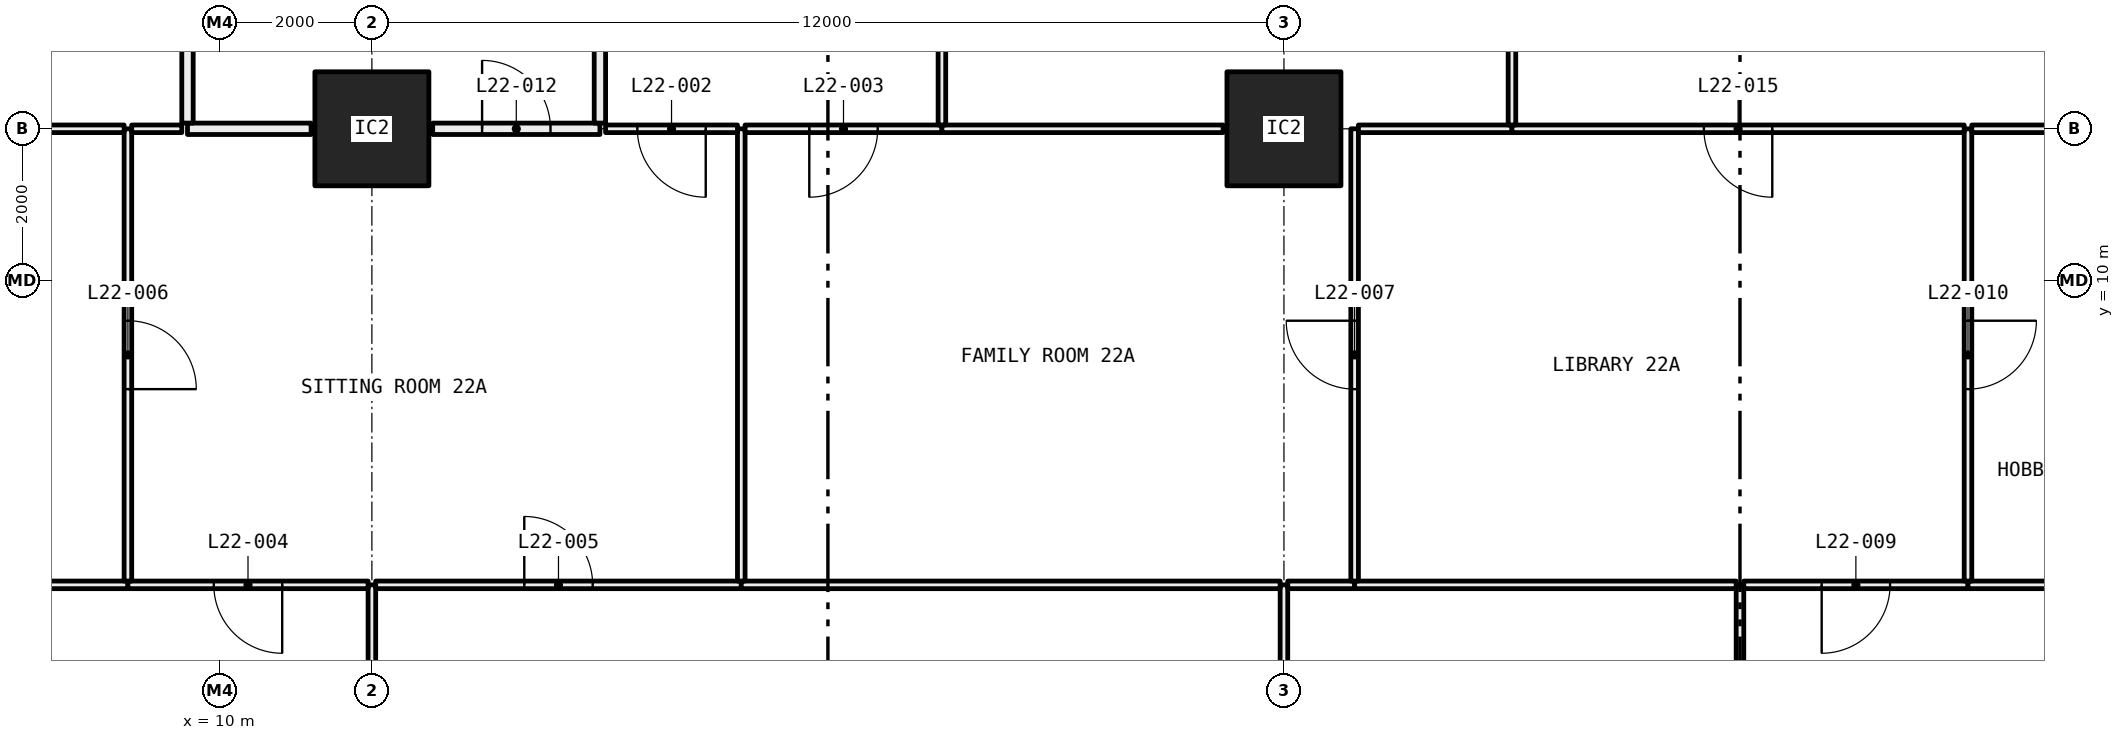
"""IFC4 building model, lengths in metres.
Left out: names, types, materials, properties, quantities, classifications, styles, units other than length and angle.
Written with IfcOpenShell. Run it as: python <this file> out.ifc"""

import sys

from ifc_helpers import new_model, si_unit, direction, frame, frame_2d, origin, origin_2d, place, context, subcontext, project, spatial, rectangle, hollow_rectangle, extrude, element, fill, save


model = new_model("IFC4")
c1 = context("Model", 3, precision=1e-05, world=origin(), true_north=direction((0.0, 1.0)))
c2 = subcontext(c1, "Body", "Model", "MODEL_VIEW")
j1 = project(units=[si_unit("LENGTHUNIT", "METRE"), si_unit("PLANEANGLEUNIT", "RADIAN")], contexts=[c1])
p1 = place(None, origin())
s1 = spatial("IfcSite", under=j1, at=p1, CompositionType="ELEMENT")
p2 = place(p1, origin())
s2 = spatial("IfcBuilding", under=s1, at=p2, CompositionType="ELEMENT")
p3 = place(p2, frame((0.0, 0.0, 88.65)))
s3 = spatial("IfcBuildingStorey", under=s2, at=p3, CompositionType="ELEMENT", Elevation=88.65)
for number, where, z_axis, x_axis in (
    (1, (12.0, 12.0, 0.0), (0.0, 0.0, 1.0), (1.0, 0.0, 0.0)),
    (2, (24.0, 12.0, 0.0), (0.0, 0.0, 1.0), (1.0, 0.0, 0.0)),
):
    element("IfcColumn", number, at=place(p3, frame(where, z_axis=z_axis, x_axis=x_axis)), inside=s3, PredefinedType="COLUMN", context=c2, shape_type="SweptSolid", body=[
        extrude(hollow_rectangle(XDim=1.5, YDim=1.5, WallThickness=0.065, at=origin_2d()), origin(), (0.0, 0.0, 1.0), 3.05),
    ])
p4 = place(p3, frame((12.0, 0.72, 0.0), z_axis=(0.0, 0.0, 1.0), x_axis=(0.0, 1.0, 0.0)))
e3 = element("IfcWall", 3, at=p4, inside=s3, PredefinedType="PARTITIONING", context=c2, shape_type="SweptSolid", body=[
    extrude(rectangle(XDim=5.28, YDim=0.1, at=frame_2d((2.64, 0.0))), origin(), (0.0, 0.0, 1.0), 2.45),
])
p5 = place(p3, frame((8.79, 6.0, 0.0), z_axis=(0.0, 0.0, 1.0), x_axis=(-1.0, 0.0, 0.0)))
e4 = element("IfcWall", 4, at=p5, inside=s3, PredefinedType="PARTITIONING", context=c2, shape_type="SweptSolid", body=[
    extrude(rectangle(XDim=2.07, YDim=0.1, at=frame_2d((1.035, 0.0))), origin(), (0.0, 0.0, 1.0), 3.05),
])
p6 = place(p3, frame((11.95, 6.0, 0.0), z_axis=(0.0, 0.0, 1.0), x_axis=(-1.0, 0.0, 0.0)))
e5 = element("IfcWall", 5, at=p6, inside=s3, PredefinedType="PARTITIONING", context=c2, shape_type="SweptSolid", body=[
    extrude(rectangle(XDim=3.16, YDim=0.1, at=frame_2d((1.58, 0.0))), origin(), (0.0, 0.0, 1.0), 2.45),
])
p7 = place(p6, frame((1.13, 0.0, 0.0)))
e6 = element("IfcOpeningElement", 6, at=p7, cuts=e5, PredefinedType="OPENING", context=c2, shape_type="SweptSolid", body=[
    extrude(rectangle(XDim=0.9, YDim=2.1, at=frame_2d((0.45, 1.05))), frame((0.0, 0.06, 0.0), z_axis=(0.0, -1.0, 0.0), x_axis=(1.0, 0.0, 0.0)), (0.0, 0.0, 1.0), 0.12),
])
p8 = place(p3, frame((24.0, 0.72, 0.0), z_axis=(0.0, 0.0, 1.0), x_axis=(0.0, 1.0, 0.0)))
e7 = element("IfcWall", 7, at=p8, inside=s3, PredefinedType="PARTITIONING", context=c2, shape_type="SweptSolid", body=[
    extrude(rectangle(XDim=5.28, YDim=0.1, at=frame_2d((2.64, 0.0))), origin(), (0.0, 0.0, 1.0), 2.45),
])
p9 = place(p8, frame((2.19, 0.0, 0.0)))
e8 = element("IfcOpeningElement", 8, at=p9, cuts=e7, PredefinedType="OPENING", context=c2, shape_type="SweptSolid", body=[
    extrude(rectangle(XDim=0.9, YDim=2.1, at=frame_2d((0.45, 1.05))), frame((0.0, 0.06, 0.0), z_axis=(0.0, -1.0, 0.0), x_axis=(1.0, 0.0, 0.0)), (0.0, 0.0, 1.0), 0.12),
])
p10 = place(p3, frame((16.86, 6.0, 0.0), z_axis=(0.0, 0.0, 1.0), x_axis=(-1.0, 0.0, 0.0)))
e9 = element("IfcWall", 9, at=p10, inside=s3, PredefinedType="PARTITIONING", context=c2, shape_type="SweptSolid", body=[
    extrude(rectangle(XDim=4.81, YDim=0.1, at=frame_2d((2.405, 0.0))), origin(), (0.0, 0.0, 1.0), 2.45),
])
p11 = place(p10, frame((1.955, 0.0, 0.0)))
e10 = element("IfcOpeningElement", 10, at=p11, cuts=e9, PredefinedType="OPENING", context=c2, shape_type="SweptSolid", body=[
    extrude(rectangle(XDim=0.9, YDim=2.1, at=frame_2d((0.45, 1.05))), frame((0.0, 0.06, 0.0), z_axis=(0.0, -1.0, 0.0), x_axis=(1.0, 0.0, 0.0)), (0.0, 0.0, 1.0), 0.12),
])
p12 = place(p3, frame((23.95, 6.0, 0.0), z_axis=(0.0, 0.0, 1.0), x_axis=(-1.0, 0.0, 0.0)))
e11 = element("IfcWall", 11, at=p12, inside=s3, PredefinedType="PARTITIONING", context=c2, shape_type="SweptSolid", body=[
    extrude(rectangle(XDim=7.09, YDim=0.1, at=frame_2d((3.545, 0.0))), origin(), (0.0, 0.0, 1.0), 2.45),
])
p13 = place(p3, frame((30.0, 0.72, 0.0), z_axis=(0.0, 0.0, 1.0), x_axis=(0.0, 1.0, 0.0)))
e12 = element("IfcWall", 12, at=p13, inside=s3, PredefinedType="PARTITIONING", context=c2, shape_type="SweptSolid", body=[
    extrude(rectangle(XDim=5.28, YDim=0.1, at=frame_2d((2.64, 0.0))), origin(), (0.0, 0.0, 1.0), 3.05),
])
p14 = place(p3, frame((24.93, 6.0, 0.0), z_axis=(0.0, 0.0, 1.0), x_axis=(-1.0, 0.0, 0.0)))
e13 = element("IfcWall", 13, at=p14, inside=s3, PredefinedType="PARTITIONING", context=c2, shape_type="SweptSolid", body=[
    extrude(rectangle(XDim=0.88, YDim=0.1, at=frame_2d((0.44, 0.0))), origin(), (0.0, 0.0, 1.0), 2.45),
])
p15 = place(p3, frame((29.95, 6.0, 0.0), z_axis=(0.0, 0.0, 1.0), x_axis=(-1.0, 0.0, 0.0)))
e14 = element("IfcWall", 14, at=p15, inside=s3, PredefinedType="PARTITIONING", context=c2, shape_type="SweptSolid", body=[
    extrude(rectangle(XDim=5.02, YDim=0.1, at=frame_2d((2.51, 0.0))), origin(), (0.0, 0.0, 1.0), 3.05),
])
p16 = place(p3, frame((33.0, 6.0, 0.0), z_axis=(0.0, 0.0, 1.0), x_axis=(-1.0, 0.0, 0.0)))
e15 = element("IfcWall", 15, at=p16, inside=s3, PredefinedType="PARTITIONING", context=c2, shape_type="SweptSolid", body=[
    extrude(rectangle(XDim=2.95, YDim=0.1, at=frame_2d((1.475, 0.0))), origin(), (0.0, 0.0, 1.0), 3.05),
])
p17 = place(p16, frame((1.025, 0.0, 0.0)))
e16 = element("IfcOpeningElement", 16, at=p17, cuts=e15, PredefinedType="OPENING", context=c2, shape_type="SweptSolid", body=[
    extrude(rectangle(XDim=0.9, YDim=2.1, at=frame_2d((0.45, 1.05))), frame((0.0, 0.06, 0.0), z_axis=(0.0, -1.0, 0.0), x_axis=(1.0, 0.0, 0.0)), (0.0, 0.0, 1.0), 0.12),
])
p18 = place(p3, frame((35.9, 6.0, 0.0), z_axis=(0.0, 0.0, 1.0), x_axis=(-1.0, 0.0, 0.0)))
e17 = element("IfcWall", 17, at=p18, inside=s3, PredefinedType="PARTITIONING", context=c2, shape_type="SweptSolid", body=[
    extrude(rectangle(XDim=2.9, YDim=0.1, at=frame_2d((1.45, 0.0))), origin(), (0.0, 0.0, 1.0), 3.05),
])
p19 = place(p3, frame((8.79, 6.05, 0.0), z_axis=(0.0, 0.0, 1.0), x_axis=(0.0, 1.0, 0.0)))
e18 = element("IfcWall", 18, at=p19, inside=s3, PredefinedType="PARTITIONING", context=c2, shape_type="SweptSolid", body=[
    extrude(rectangle(XDim=5.95, YDim=0.1, at=frame_2d((2.975, 0.0))), origin(), (0.0, 0.0, 1.0), 2.45),
])
p20 = place(p19, frame((2.525, 0.0, 0.0)))
e19 = element("IfcOpeningElement", 19, at=p20, cuts=e18, PredefinedType="OPENING", context=c2, shape_type="SweptSolid", body=[
    extrude(rectangle(XDim=0.9, YDim=2.1, at=frame_2d((0.45, 1.05))), frame((0.0, 0.06, 0.0), z_axis=(0.0, -1.0, 0.0), x_axis=(1.0, 0.0, 0.0)), (0.0, 0.0, 1.0), 0.12),
])
p21 = place(p3, frame((8.74, 12.0, 0.0), z_axis=(0.0, 0.0, 1.0), x_axis=(-1.0, 0.0, 0.0)))
e20 = element("IfcWall", 20, at=p21, inside=s3, PredefinedType="PARTITIONING", context=c2, shape_type="SweptSolid", body=[
    extrude(rectangle(XDim=8.02, YDim=0.1, at=frame_2d((4.01, 0.0))), origin(), (0.0, 0.0, 1.0), 2.45),
])
p22 = place(p21, frame((3.56, 0.0, 0.0)))
e21 = element("IfcOpeningElement", 21, at=p22, cuts=e20, PredefinedType="OPENING", context=c2, shape_type="SweptSolid", body=[
    extrude(rectangle(XDim=0.9, YDim=2.1, at=frame_2d((0.45, 1.05))), frame((0.0, 0.06, 0.0), z_axis=(0.0, -1.0, 0.0), x_axis=(1.0, 0.0, 0.0)), (0.0, 0.0, 1.0), 0.12),
])
p23 = place(p3, frame((16.86, 6.05, 0.0), z_axis=(0.0, 0.0, 1.0), x_axis=(0.0, 1.0, 0.0)))
e22 = element("IfcWall", 22, at=p23, inside=s3, PredefinedType="PARTITIONING", context=c2, shape_type="SweptSolid", body=[
    extrude(rectangle(XDim=5.95, YDim=0.1, at=frame_2d((2.975, 0.0))), origin(), (0.0, 0.0, 1.0), 2.45),
])
p24 = place(p3, frame((9.499, 12.0, 0.0), z_axis=(0.0, 0.0, 1.0), x_axis=(-1.0, 0.0, 0.0)))
e23 = element("IfcWall", 23, at=p24, inside=s3, PredefinedType="PARTITIONING", context=c2, shape_type="SweptSolid", body=[
    extrude(rectangle(XDim=0.659, YDim=0.1, at=frame_2d((0.33, 0.0))), origin(), (0.0, 0.0, 1.0), 2.45),
])
p25 = place(p3, frame((11.2, 12.0, 0.0), z_axis=(0.0, 0.0, 1.0), x_axis=(-1.0, 0.0, 0.0)))
e24 = element("IfcWall", 24, at=p25, inside=s3, PredefinedType="PARTITIONING", context=c2, shape_type="SweptSolid", body=[
    extrude(rectangle(XDim=1.626, YDim=0.15, at=frame_2d((0.813, 0.0))), origin(), (0.0, 0.0, 1.0), 2.45),
])
p26 = place(p3, frame((15.0, 12.0, 0.0), z_axis=(0.0, 0.0, 1.0), x_axis=(-1.0, 0.0, 0.0)))
e25 = element("IfcWall", 25, at=p26, inside=s3, PredefinedType="PARTITIONING", context=c2, shape_type="SweptSolid", body=[
    extrude(rectangle(XDim=2.2, YDim=0.15, at=frame_2d((1.1, 0.0))), origin(), (0.0, 0.0, 1.0), 2.45),
])
p27 = place(p26, frame((0.65, 0.0, 0.0)))
e26 = element("IfcOpeningElement", 26, at=p27, cuts=e25, PredefinedType="OPENING", context=c2, shape_type="SweptSolid", body=[
    extrude(rectangle(XDim=0.9, YDim=2.1, at=frame_2d((0.45, 1.05))), frame((0.0, 0.085, 0.0), z_axis=(0.0, -1.0, 0.0), x_axis=(1.0, 0.0, 0.0)), (0.0, 0.0, 1.0), 0.17),
])
p28 = place(p3, frame((16.81, 12.0, 0.0), z_axis=(0.0, 0.0, 1.0), x_axis=(-1.0, 0.0, 0.0)))
e27 = element("IfcWall", 27, at=p28, inside=s3, PredefinedType="PARTITIONING", context=c2, shape_type="SweptSolid", body=[
    extrude(rectangle(XDim=1.735, YDim=0.1, at=frame_2d((0.868, 0.0))), origin(), (0.0, 0.0, 1.0), 2.45),
])
p29 = place(p28, frame((0.417, 0.0, 0.0)))
e28 = element("IfcOpeningElement", 28, at=p29, cuts=e27, PredefinedType="OPENING", context=c2, shape_type="SweptSolid", body=[
    extrude(rectangle(XDim=0.9, YDim=2.1, at=frame_2d((0.45, 1.05))), frame((0.0, 0.06, 0.0), z_axis=(0.0, -1.0, 0.0), x_axis=(1.0, 0.0, 0.0)), (0.0, 0.0, 1.0), 0.12),
])
p30 = place(p3, frame((24.93, 6.05, 0.0), z_axis=(0.0, 0.0, 1.0), x_axis=(0.0, 1.0, 0.0)))
e29 = element("IfcWall", 29, at=p30, inside=s3, PredefinedType="PARTITIONING", context=c2, shape_type="SweptSolid", body=[
    extrude(rectangle(XDim=5.95, YDim=0.1, at=frame_2d((2.975, 0.0))), origin(), (0.0, 0.0, 1.0), 2.45),
])
p31 = place(p30, frame((2.525, 0.0, 0.0)))
e30 = element("IfcOpeningElement", 30, at=p31, cuts=e29, PredefinedType="OPENING", context=c2, shape_type="SweptSolid", body=[
    extrude(rectangle(XDim=0.9, YDim=2.1, at=frame_2d((0.45, 1.05))), frame((0.0, 0.06, 0.0), z_axis=(0.0, -1.0, 0.0), x_axis=(1.0, 0.0, 0.0)), (0.0, 0.0, 1.0), 0.12),
])
p32 = place(p3, frame((19.5, 12.0, 0.0), z_axis=(0.0, 0.0, 1.0), x_axis=(-1.0, 0.0, 0.0)))
e31 = element("IfcWall", 31, at=p32, inside=s3, PredefinedType="PARTITIONING", context=c2, shape_type="SweptSolid", body=[
    extrude(rectangle(XDim=2.59, YDim=0.1, at=frame_2d((1.295, 0.0))), origin(), (0.0, 0.0, 1.0), 2.45),
])
p33 = place(p32, frame((0.845, 0.0, 0.0)))
e32 = element("IfcOpeningElement", 32, at=p33, cuts=e31, PredefinedType="OPENING", context=c2, shape_type="SweptSolid", body=[
    extrude(rectangle(XDim=0.9, YDim=2.1, at=frame_2d((0.45, 1.05))), frame((0.0, 0.06, 0.0), z_axis=(0.0, -1.0, 0.0), x_axis=(1.0, 0.0, 0.0)), (0.0, 0.0, 1.0), 0.12),
])
p34 = place(p3, frame((23.2, 12.0, 0.0), z_axis=(0.0, 0.0, 1.0), x_axis=(-1.0, 0.0, 0.0)))
e33 = element("IfcWall", 33, at=p34, inside=s3, PredefinedType="PARTITIONING", context=c2, shape_type="SweptSolid", body=[
    extrude(rectangle(XDim=3.7, YDim=0.1, at=frame_2d((1.85, 0.0))), origin(), (0.0, 0.0, 1.0), 2.45),
])
p35 = place(p3, frame((33.0, 6.05, 0.0), z_axis=(0.0, 0.0, 1.0), x_axis=(0.0, 1.0, 0.0)))
e34 = element("IfcWall", 34, at=p35, inside=s3, PredefinedType="PARTITIONING", context=c2, shape_type="SweptSolid", body=[
    extrude(rectangle(XDim=5.95, YDim=0.1, at=frame_2d((2.975, 0.0))), origin(), (0.0, 0.0, 1.0), 2.45),
])
p36 = place(p35, frame((2.525, 0.0, 0.0)))
e35 = element("IfcOpeningElement", 35, at=p36, cuts=e34, PredefinedType="OPENING", context=c2, shape_type="SweptSolid", body=[
    extrude(rectangle(XDim=0.9, YDim=2.1, at=frame_2d((0.45, 1.05))), frame((0.0, 0.06, 0.0), z_axis=(0.0, -1.0, 0.0), x_axis=(1.0, 0.0, 0.0)), (0.0, 0.0, 1.0), 0.12),
])
p37 = place(p3, frame((27.0, 12.0, 0.0), z_axis=(0.0, 0.0, 1.0), x_axis=(-1.0, 0.0, 0.0)))
e36 = element("IfcWall", 36, at=p37, inside=s3, PredefinedType="PARTITIONING", context=c2, shape_type="SweptSolid", body=[
    extrude(rectangle(XDim=2.02, YDim=0.1, at=frame_2d((1.01, 0.0))), origin(), (0.0, 0.0, 1.0), 2.45),
])
p38 = place(p3, frame((32.95, 12.0, 0.0), z_axis=(0.0, 0.0, 1.0), x_axis=(-1.0, 0.0, 0.0)))
e37 = element("IfcWall", 37, at=p38, inside=s3, PredefinedType="PARTITIONING", context=c2, shape_type="SweptSolid", body=[
    extrude(rectangle(XDim=5.95, YDim=0.1, at=frame_2d((2.975, 0.0))), origin(), (0.0, 0.0, 1.0), 2.45),
])
p39 = place(p38, frame((2.525, 0.0, 0.0)))
e38 = element("IfcOpeningElement", 38, at=p39, cuts=e37, PredefinedType="OPENING", context=c2, shape_type="SweptSolid", body=[
    extrude(rectangle(XDim=0.9, YDim=2.1, at=frame_2d((0.45, 1.05))), frame((0.0, 0.06, 0.0), z_axis=(0.0, -1.0, 0.0), x_axis=(1.0, 0.0, 0.0)), (0.0, 0.0, 1.0), 0.12),
])
p40 = place(p3, frame((35.2, 12.0, 0.0), z_axis=(0.0, 0.0, 1.0), x_axis=(-1.0, 0.0, 0.0)))
e39 = element("IfcWall", 39, at=p40, inside=s3, PredefinedType="PARTITIONING", context=c2, shape_type="SweptSolid", body=[
    extrude(rectangle(XDim=2.15, YDim=0.1, at=frame_2d((1.075, 0.0))), origin(), (0.0, 0.0, 1.0), 2.45),
])
p41 = place(p3, frame((9.574, 12.075, 0.0), z_axis=(0.0, 0.0, 1.0), x_axis=(0.0, 1.0, 0.0)))
e40 = element("IfcWall", 40, at=p41, inside=s3, PredefinedType="PARTITIONING", context=c2, shape_type="SweptSolid", body=[
    extrude(rectangle(XDim=2.925, YDim=0.15, at=frame_2d((1.462, 0.0))), origin(), (0.0, 0.0, 1.0), 2.45),
])
p42 = place(p3, frame((15.0, 12.075, 0.0), z_axis=(0.0, 0.0, 1.0), x_axis=(0.0, 1.0, 0.0)))
e41 = element("IfcWall", 41, at=p42, inside=s3, PredefinedType="PARTITIONING", context=c2, shape_type="SweptSolid", body=[
    extrude(rectangle(XDim=2.85, YDim=0.15, at=frame_2d((1.425, 0.0))), origin(), (0.0, 0.0, 1.0), 2.45),
])
p43 = place(p3, frame((19.5, 12.05, 0.0), z_axis=(0.0, 0.0, 1.0), x_axis=(0.0, 1.0, 0.0)))
e42 = element("IfcWall", 42, at=p43, inside=s3, PredefinedType="PARTITIONING", context=c2, shape_type="SweptSolid", body=[
    extrude(rectangle(XDim=5.85, YDim=0.1, at=frame_2d((2.925, 0.0))), origin(), (0.0, 0.0, 1.0), 2.45),
])
p44 = place(p43, frame((2.475, 0.0, 0.0)))
e43 = element("IfcOpeningElement", 43, at=p44, cuts=e42, PredefinedType="OPENING", context=c2, shape_type="SweptSolid", body=[
    extrude(rectangle(XDim=0.9, YDim=2.1, at=frame_2d((0.45, 1.05))), frame((0.0, 0.06, 0.0), z_axis=(0.0, -1.0, 0.0), x_axis=(1.0, 0.0, 0.0)), (0.0, 0.0, 1.0), 0.12),
])
p45 = place(p3, frame((27.0, 12.05, 0.0), z_axis=(0.0, 0.0, 1.0), x_axis=(0.0, 1.0, 0.0)))
e44 = element("IfcWall", 44, at=p45, inside=s3, PredefinedType="PARTITIONING", context=c2, shape_type="SweptSolid", body=[
    extrude(rectangle(XDim=5.95, YDim=0.1, at=frame_2d((2.975, 0.0))), origin(), (0.0, 0.0, 1.0), 2.45),
])
p46 = place(p29, origin())
e45 = element("IfcDoor", 45, at=p46, inside=s3, OperationType="SINGLE_SWING_RIGHT", PredefinedType="DOOR", context=c2, shape_type="SweptSolid", body=[
    extrude(rectangle(XDim=0.9, YDim=2.1, at=frame_2d((0.45, 1.05))), frame((0.0, 0.025, 0.0), z_axis=(0.0, -1.0, 0.0), x_axis=(1.0, 0.0, 0.0)), (0.0, 0.0, 1.0), 0.05),
])
fill(e28, e45)
p47 = place(p33, origin())
e46 = element("IfcDoor", 46, at=p47, inside=s3, OperationType="SINGLE_SWING_LEFT", PredefinedType="DOOR", context=c2, shape_type="SweptSolid", body=[
    extrude(rectangle(XDim=0.9, YDim=2.1, at=frame_2d((0.45, 1.05))), frame((0.0, 0.025, 0.0), z_axis=(0.0, -1.0, 0.0), x_axis=(1.0, 0.0, 0.0)), (0.0, 0.0, 1.0), 0.05),
])
fill(e32, e46)
p48 = place(p7, origin())
e47 = element("IfcDoor", 47, at=p48, inside=s3, OperationType="SINGLE_SWING_RIGHT", PredefinedType="DOOR", context=c2, shape_type="SweptSolid", body=[
    extrude(rectangle(XDim=0.9, YDim=2.1, at=frame_2d((0.45, 1.05))), frame((0.0, 0.025, 0.0), z_axis=(0.0, -1.0, 0.0), x_axis=(1.0, 0.0, 0.0)), (0.0, 0.0, 1.0), 0.05),
])
fill(e6, e47)
p49 = place(p11, frame((0.9, 0.0, 0.0), x_axis=(-1.0, 0.0, 0.0)))
e48 = element("IfcDoor", 48, at=p49, inside=s3, OperationType="SINGLE_SWING_RIGHT", PredefinedType="DOOR", context=c2, shape_type="SweptSolid", body=[
    extrude(rectangle(XDim=0.9, YDim=2.1, at=frame_2d((0.45, 1.05))), frame((0.0, 0.025, 0.0), z_axis=(0.0, -1.0, 0.0), x_axis=(1.0, 0.0, 0.0)), (0.0, 0.0, 1.0), 0.05),
])
fill(e10, e48)
p50 = place(p20, frame((0.9, 0.0, 0.0), x_axis=(-1.0, 0.0, 0.0)))
e49 = element("IfcDoor", 49, at=p50, inside=s3, OperationType="SINGLE_SWING_LEFT", PredefinedType="DOOR", context=c2, shape_type="SweptSolid", body=[
    extrude(rectangle(XDim=0.9, YDim=2.1, at=frame_2d((0.45, 1.05))), frame((0.0, 0.025, 0.0), z_axis=(0.0, -1.0, 0.0), x_axis=(1.0, 0.0, 0.0)), (0.0, 0.0, 1.0), 0.05),
])
fill(e19, e49)
p51 = place(p31, origin())
e50 = element("IfcDoor", 50, at=p51, inside=s3, OperationType="SINGLE_SWING_LEFT", PredefinedType="DOOR", context=c2, shape_type="SweptSolid", body=[
    extrude(rectangle(XDim=0.9, YDim=2.1, at=frame_2d((0.45, 1.05))), frame((0.0, 0.025, 0.0), z_axis=(0.0, -1.0, 0.0), x_axis=(1.0, 0.0, 0.0)), (0.0, 0.0, 1.0), 0.05),
])
fill(e30, e50)
p52 = place(p17, origin())
e51 = element("IfcDoor", 51, at=p52, inside=s3, OperationType="SINGLE_SWING_LEFT", PredefinedType="DOOR", context=c2, shape_type="SweptSolid", body=[
    extrude(rectangle(XDim=0.9, YDim=2.1, at=frame_2d((0.45, 1.05))), frame((0.0, 0.025, 0.0), z_axis=(0.0, -1.0, 0.0), x_axis=(1.0, 0.0, 0.0)), (0.0, 0.0, 1.0), 0.05),
])
fill(e16, e51)
p53 = place(p36, frame((0.9, 0.0, 0.0), x_axis=(-1.0, 0.0, 0.0)))
e52 = element("IfcDoor", 52, at=p53, inside=s3, OperationType="SINGLE_SWING_RIGHT", PredefinedType="DOOR", context=c2, shape_type="SweptSolid", body=[
    extrude(rectangle(XDim=0.9, YDim=2.1, at=frame_2d((0.45, 1.05))), frame((0.0, 0.025, 0.0), z_axis=(0.0, -1.0, 0.0), x_axis=(1.0, 0.0, 0.0)), (0.0, 0.0, 1.0), 0.05),
])
fill(e35, e52)
p54 = place(p27, frame((0.9, 0.0, 0.0), x_axis=(-1.0, 0.0, 0.0)))
e53 = element("IfcDoor", 53, at=p54, inside=s3, OperationType="SINGLE_SWING_RIGHT", PredefinedType="DOOR", context=c2, shape_type="SweptSolid", body=[
    extrude(rectangle(XDim=0.9, YDim=2.1, at=frame_2d((0.45, 1.05))), frame((0.0, 0.025, 0.0), z_axis=(0.0, -1.0, 0.0), x_axis=(1.0, 0.0, 0.0)), (0.0, 0.0, 1.0), 0.05),
])
fill(e26, e53)
p55 = place(p39, origin())
e54 = element("IfcDoor", 54, at=p55, inside=s3, OperationType="SINGLE_SWING_RIGHT", PredefinedType="DOOR", context=c2, shape_type="SweptSolid", body=[
    extrude(rectangle(XDim=0.9, YDim=2.1, at=frame_2d((0.45, 1.05))), frame((0.0, 0.025, 0.0), z_axis=(0.0, -1.0, 0.0), x_axis=(1.0, 0.0, 0.0)), (0.0, 0.0, 1.0), 0.05),
])
fill(e38, e54)
save(model, sys.argv[1])
